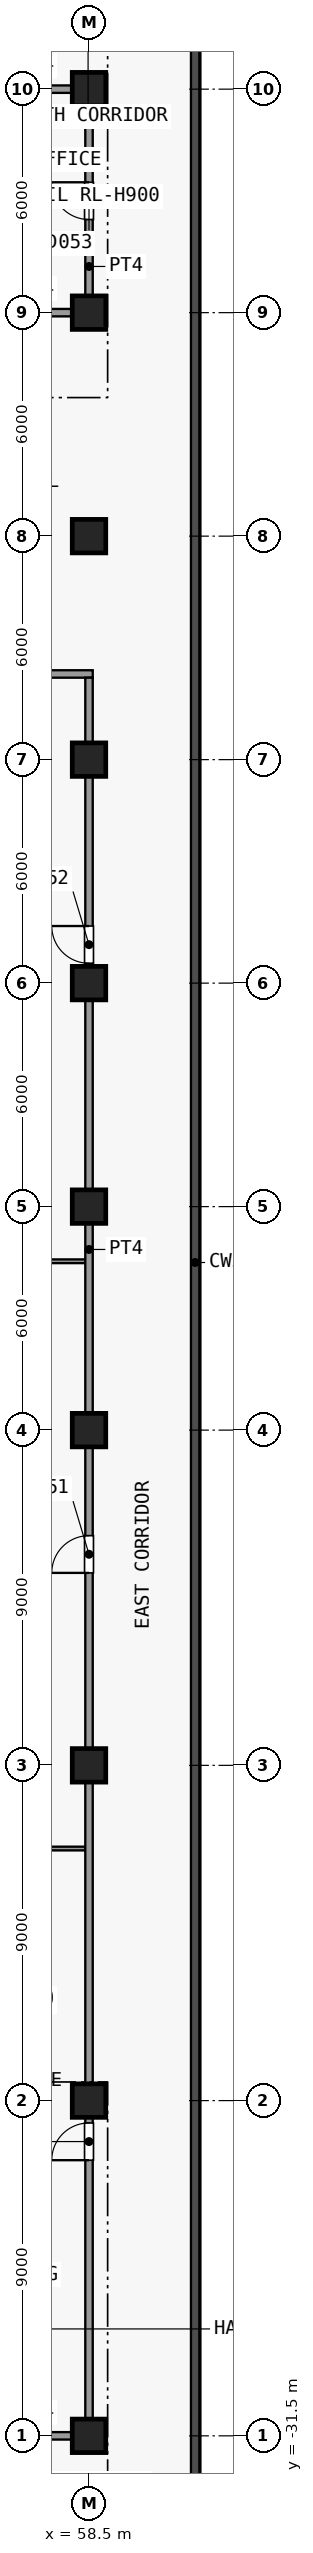
"""IFC4 building model, lengths in metres.
Left out: names, types, materials, properties, quantities, classifications, styles, units other than length and angle.
Written with IfcOpenShell. Run it as: python <this file> out.ifc"""

import sys

from ifc_helpers import new_model, si_unit, direction, frame, frame_2d, origin, origin_2d, place, context, subcontext, project, spatial, rectangle, extrude, element, fill, save


model = new_model("IFC4")
c1 = context("Model", 3, precision=1e-05, world=origin(), true_north=direction((0.0, 1.0)))
c2 = subcontext(c1, "Body", "Model", "MODEL_VIEW")
j1 = project(units=[si_unit("LENGTHUNIT", "METRE"), si_unit("PLANEANGLEUNIT", "RADIAN")], contexts=[c1])
p1 = place(None, origin())
s1 = spatial("IfcSite", under=j1, at=p1, CompositionType="ELEMENT")
p2 = place(p1, origin())
s2 = spatial("IfcBuilding", under=s1, at=p2, CompositionType="ELEMENT")
p3 = place(p2, frame((0.0, 0.0, 13.5)))
s3 = spatial("IfcBuildingStorey", under=s2, at=p3, CompositionType="ELEMENT", Elevation=13.5)
for number, where, z_axis, x_axis in (
    (1, (58.5, -31.5, 0.0), (0.0, 0.0, 1.0), (1.0, 0.0, 0.0)),
    (2, (58.5, -22.5, 0.0), (0.0, 0.0, 1.0), (1.0, 0.0, 0.0)),
    (3, (58.5, -13.5, 0.0), (0.0, 0.0, 1.0), (1.0, 0.0, 0.0)),
    (4, (58.5, -4.5, 0.0), (0.0, 0.0, 1.0), (1.0, 0.0, 0.0)),
    (5, (58.5, 1.5, 0.0), (0.0, 0.0, 1.0), (1.0, 0.0, 0.0)),
    (6, (58.5, 7.5, 0.0), (0.0, 0.0, 1.0), (1.0, 0.0, 0.0)),
    (7, (58.5, 13.5, 0.0), (0.0, 0.0, 1.0), (1.0, 0.0, 0.0)),
    (8, (58.5, 19.5, 0.0), (0.0, 0.0, 1.0), (1.0, 0.0, 0.0)),
    (9, (58.5, 25.5, 0.0), (0.0, 0.0, 1.0), (1.0, 0.0, 0.0)),
    (10, (58.5, 31.5, 0.0), (0.0, 0.0, 1.0), (1.0, 0.0, 0.0)),
):
    element("IfcColumn", number, at=place(p3, frame(where, z_axis=z_axis, x_axis=x_axis)), inside=s3, PredefinedType="COLUMN", context=c2, shape_type="SweptSolid", body=[
        extrude(rectangle(XDim=0.9, YDim=0.9, at=origin_2d()), origin(), (0.0, 0.0, 1.0), 5.0),
    ])
p4 = place(p3, frame((55.6, -31.5, 0.0), z_axis=(0.0, 0.0, 1.0), x_axis=(1.0, 0.0, 0.0)))
e11 = element("IfcWall", 11, at=p4, inside=s3, PredefinedType="PARTITIONING", context=c2, shape_type="SweptSolid", body=[
    extrude(rectangle(XDim=3.0, YDim=0.2, at=frame_2d((1.5, 0.0))), origin(), (0.0, 0.0, 1.0), 4.65),
])
for number, where, z_axis, x_axis in (
    (12, (52.6, -15.733, 0.0), (0.0, 0.0, 1.0), (1.0, 0.0, 0.0)),
    (13, (52.6, 0.033, 0.0), (0.0, 0.0, 1.0), (1.0, 0.0, 0.0)),
):
    element("IfcWall", number, at=place(p3, frame(where, z_axis=z_axis, x_axis=x_axis)), inside=s3, PredefinedType="PARTITIONING", context=c2, shape_type="SweptSolid", body=[
        extrude(rectangle(XDim=5.8, YDim=0.1, at=frame_2d((2.9, 0.0))), origin(), (0.0, 0.0, 1.0), 4.65),
    ])
p5 = place(p3, frame((52.4, 15.8, 0.0), z_axis=(0.0, 0.0, 1.0), x_axis=(1.0, 0.0, 0.0)))
e14 = element("IfcWall", 14, at=p5, inside=s3, PredefinedType="PARTITIONING", context=c2, shape_type="SweptSolid", body=[
    extrude(rectangle(XDim=6.2, YDim=0.2, at=frame_2d((3.1, 0.0))), origin(), (0.0, 0.0, 1.0), 4.65),
])
for number, where, z_axis, x_axis in (
    (15, (55.6, 25.5, 0.0), (0.0, 0.0, 1.0), (1.0, 0.0, 0.0)),
    (16, (55.6, 31.5, 0.0), (0.0, 0.0, 1.0), (1.0, 0.0, 0.0)),
):
    element("IfcWall", number, at=place(p3, frame(where, z_axis=z_axis, x_axis=x_axis)), inside=s3, PredefinedType="PARTITIONING", context=c2, shape_type="SweptSolid", body=[
        extrude(rectangle(XDim=3.0, YDim=0.2, at=frame_2d((1.5, 0.0))), origin(), (0.0, 0.0, 1.0), 4.65),
    ])
p6 = place(p3, frame((58.5, -31.4, 0.0), z_axis=(0.0, 0.0, 1.0), x_axis=(0.0, 1.0, 0.0)))
e17 = element("IfcWall", 17, at=p6, inside=s3, PredefinedType="PARTITIONING", context=c2, shape_type="SweptSolid", body=[
    extrude(rectangle(XDim=47.1, YDim=0.2, at=frame_2d((23.55, 0.0))), origin(), (0.0, 0.0, 1.0), 4.65),
])
p7 = place(p6, frame((7.3, 0.0, 0.0)))
e18 = element("IfcOpeningElement", 18, at=p7, cuts=e17, PredefinedType="OPENING", context=c2, shape_type="SweptSolid", body=[
    extrude(rectangle(XDim=1.0, YDim=2.1, at=frame_2d((0.5, 1.05))), frame((0.0, 0.11, 0.0), z_axis=(0.0, -1.0, 0.0), x_axis=(1.0, 0.0, 0.0)), (0.0, 0.0, 1.0), 0.22),
])
p8 = place(p6, frame((23.067, 0.0, 0.0)))
e19 = element("IfcOpeningElement", 19, at=p8, cuts=e17, PredefinedType="OPENING", context=c2, shape_type="SweptSolid", body=[
    extrude(rectangle(XDim=1.0, YDim=2.1, at=frame_2d((0.5, 1.05))), frame((0.0, 0.11, 0.0), z_axis=(0.0, -1.0, 0.0), x_axis=(1.0, 0.0, 0.0)), (0.0, 0.0, 1.0), 0.22),
])
p9 = place(p6, frame((39.433, 0.0, 0.0)))
e20 = element("IfcOpeningElement", 20, at=p9, cuts=e17, PredefinedType="OPENING", context=c2, shape_type="SweptSolid", body=[
    extrude(rectangle(XDim=1.0, YDim=2.1, at=frame_2d((0.5, 1.05))), frame((0.0, 0.11, 0.0), z_axis=(0.0, -1.0, 0.0), x_axis=(1.0, 0.0, 0.0)), (0.0, 0.0, 1.0), 0.22),
])
p10 = place(p3, frame((58.5, 25.6, 0.0), z_axis=(0.0, 0.0, 1.0), x_axis=(0.0, 1.0, 0.0)))
e21 = element("IfcWall", 21, at=p10, inside=s3, PredefinedType="PARTITIONING", context=c2, shape_type="SweptSolid", body=[
    extrude(rectangle(XDim=5.8, YDim=0.2, at=frame_2d((2.9, 0.0))), origin(), (0.0, 0.0, 1.0), 4.65),
])
p11 = place(p10, frame((2.4, 0.0, 0.0)))
e22 = element("IfcOpeningElement", 22, at=p11, cuts=e21, PredefinedType="OPENING", context=c2, shape_type="SweptSolid", body=[
    extrude(rectangle(XDim=1.0, YDim=2.1, at=frame_2d((0.5, 1.05))), frame((0.0, 0.11, 0.0), z_axis=(0.0, -1.0, 0.0), x_axis=(1.0, 0.0, 0.0)), (0.0, 0.0, 1.0), 0.22),
])
p12 = place(p7, origin())
e23 = element("IfcDoor", 23, at=p12, inside=s3, OperationType="SINGLE_SWING_RIGHT", PredefinedType="DOOR", context=c2, shape_type="SweptSolid", body=[
    extrude(rectangle(XDim=1.0, YDim=2.1, at=frame_2d((0.5, 1.05))), frame((0.0, 0.025, 0.0), z_axis=(0.0, -1.0, 0.0), x_axis=(1.0, 0.0, 0.0)), (0.0, 0.0, 1.0), 0.05),
])
fill(e18, e23)
p13 = place(p8, origin())
e24 = element("IfcDoor", 24, at=p13, inside=s3, OperationType="SINGLE_SWING_RIGHT", PredefinedType="DOOR", context=c2, shape_type="SweptSolid", body=[
    extrude(rectangle(XDim=1.0, YDim=2.1, at=frame_2d((0.5, 1.05))), frame((0.0, 0.025, 0.0), z_axis=(0.0, -1.0, 0.0), x_axis=(1.0, 0.0, 0.0)), (0.0, 0.0, 1.0), 0.05),
])
fill(e19, e24)
p14 = place(p9, origin())
e25 = element("IfcDoor", 25, at=p14, inside=s3, OperationType="SINGLE_SWING_LEFT", PredefinedType="DOOR", context=c2, shape_type="SweptSolid", body=[
    extrude(rectangle(XDim=1.0, YDim=2.1, at=frame_2d((0.5, 1.05))), frame((0.0, 0.025, 0.0), z_axis=(0.0, -1.0, 0.0), x_axis=(1.0, 0.0, 0.0)), (0.0, 0.0, 1.0), 0.05),
])
fill(e20, e25)
p15 = place(p11, origin())
e26 = element("IfcDoor", 26, at=p15, inside=s3, OperationType="SINGLE_SWING_LEFT", PredefinedType="DOOR", context=c2, shape_type="SweptSolid", body=[
    extrude(rectangle(XDim=1.0, YDim=2.1, at=frame_2d((0.5, 1.05))), frame((0.0, 0.025, 0.0), z_axis=(0.0, -1.0, 0.0), x_axis=(1.0, 0.0, 0.0)), (0.0, 0.0, 1.0), 0.05),
])
fill(e22, e26)
save(model, sys.argv[1])
